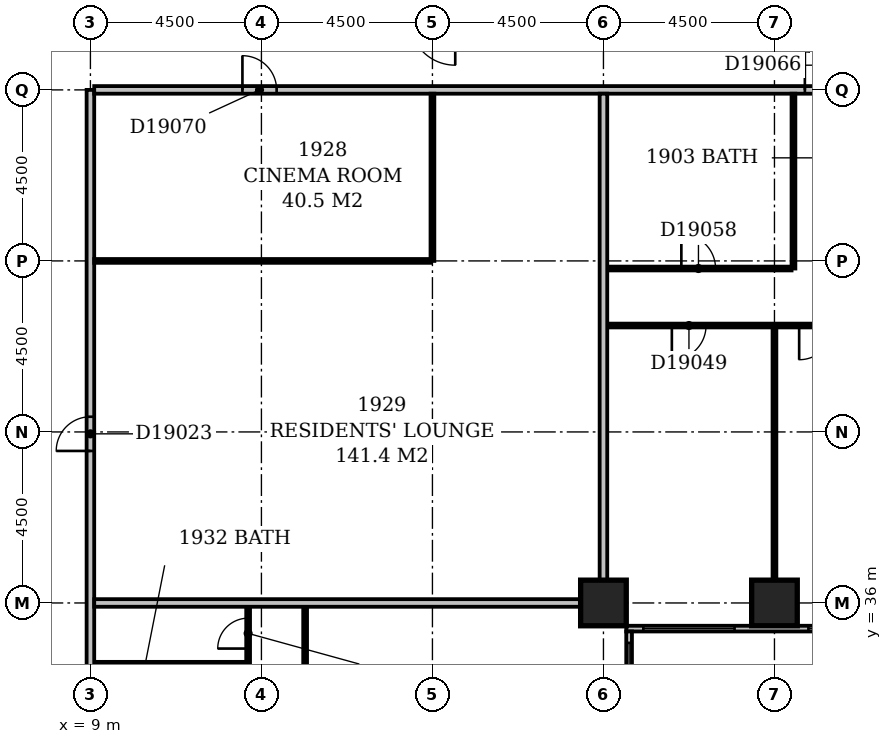
"""IFC4 building model, lengths in metres.
Left out: names, types, materials, properties, quantities, classifications, styles, units other than length and angle.
Written with IfcOpenShell. Run it as: python <this file> out.ifc"""

import sys

from ifc_helpers import new_model, si_unit, direction, frame, frame_2d, origin, origin_2d, place, context, subcontext, project, spatial, rectangle, extrude, element, fill, save


model = new_model("IFC4")
c1 = context("Model", 3, precision=1e-05, world=origin(), true_north=direction((0.0, 1.0)))
c2 = subcontext(c1, "Body", "Model", "MODEL_VIEW")
j1 = project(units=[si_unit("LENGTHUNIT", "METRE"), si_unit("PLANEANGLEUNIT", "RADIAN")], contexts=[c1])
p1 = place(None, origin())
s1 = spatial("IfcSite", under=j1, at=p1, CompositionType="ELEMENT")
p2 = place(p1, origin())
s2 = spatial("IfcBuilding", under=s1, at=p2, CompositionType="ELEMENT")
p3 = place(p2, frame((0.0, 0.0, 79.4)))
s3 = spatial("IfcBuildingStorey", under=s2, at=p3, CompositionType="ELEMENT", Elevation=79.4)
for number, where, z_axis, x_axis in (
    (1, (22.5, 36.0, -0.3), (0.0, 0.0, 1.0), (1.0, 0.0, 0.0)),
    (2, (27.0, 36.0, -0.3), (0.0, 0.0, 1.0), (1.0, 0.0, 0.0)),
):
    element("IfcColumn", number, at=place(p3, frame(where, z_axis=z_axis, x_axis=x_axis)), inside=s3, PredefinedType="COLUMN", context=c2, shape_type="SweptSolid", body=[
        extrude(rectangle(XDim=1.2, YDim=1.2, at=origin_2d()), origin(), (0.0, 0.0, 1.0), 3.6),
    ])
p4 = place(p3, frame((23.175, 17.4, 0.0), z_axis=(0.0, 0.0, 1.0), x_axis=(0.0, 1.0, 0.0)))
e3 = element("IfcWall", 3, at=p4, inside=s3, PredefinedType="STANDARD", context=c2, shape_type="SweptSolid", body=[
    extrude(rectangle(XDim=17.85, YDim=0.15, at=frame_2d((8.925, 0.0))), origin(), (0.0, 0.0, 1.0), 2.7),
])
p5 = place(p4, frame((1.65, 0.0, 0.6)))
e4 = element("IfcOpeningElement", 4, at=p5, cuts=e3, PredefinedType="OPENING", context=c2, shape_type="SweptSolid", body=[
    extrude(rectangle(XDim=2.4, YDim=1.8, at=frame_2d((1.2, 0.9))), frame((0.0, 0.087, 0.0), z_axis=(0.0, -1.0, 0.0), x_axis=(1.0, 0.0, 0.0)), (0.0, 0.0, 1.0), 0.174),
])
p6 = place(p4, frame((6.15, 0.0, 0.6)))
e5 = element("IfcOpeningElement", 5, at=p6, cuts=e3, PredefinedType="OPENING", context=c2, shape_type="SweptSolid", body=[
    extrude(rectangle(XDim=2.4, YDim=1.8, at=frame_2d((1.2, 0.9))), frame((0.0, 0.087, 0.0), z_axis=(0.0, -1.0, 0.0), x_axis=(1.0, 0.0, 0.0)), (0.0, 0.0, 1.0), 0.174),
])
p7 = place(p4, frame((11.448, 0.0, 0.6)))
e6 = element("IfcOpeningElement", 6, at=p7, cuts=e3, PredefinedType="OPENING", context=c2, shape_type="SweptSolid", body=[
    extrude(rectangle(XDim=1.8, YDim=1.8, at=frame_2d((0.9, 0.9))), frame((0.0, 0.087, 0.0), z_axis=(0.0, -1.0, 0.0), x_axis=(1.0, 0.0, 0.0)), (0.0, 0.0, 1.0), 0.174),
])
p8 = place(p4, frame((15.15, 0.0, 0.6)))
e7 = element("IfcOpeningElement", 7, at=p8, cuts=e3, PredefinedType="OPENING", context=c2, shape_type="SweptSolid", body=[
    extrude(rectangle(XDim=2.4, YDim=1.8, at=frame_2d((1.2, 0.9))), frame((0.0, 0.087, 0.0), z_axis=(0.0, -1.0, 0.0), x_axis=(1.0, 0.0, 0.0)), (0.0, 0.0, 1.0), 0.174),
])
p9 = place(p3, frame((23.1, 35.325, 0.0), z_axis=(0.0, 0.0, 1.0), x_axis=(1.0, 0.0, 0.0)))
e8 = element("IfcWall", 8, at=p9, inside=s3, PredefinedType="STANDARD", context=c2, shape_type="SweptSolid", body=[
    extrude(rectangle(XDim=45.15, YDim=0.15, at=frame_2d((22.575, 0.0))), origin(), (0.0, 0.0, 1.0), 2.7),
])
p10 = place(p9, frame((0.45, 0.0, 0.6)))
e9 = element("IfcOpeningElement", 9, at=p10, cuts=e8, PredefinedType="OPENING", context=c2, shape_type="SweptSolid", body=[
    extrude(rectangle(XDim=2.4, YDim=1.8, at=frame_2d((1.2, 0.9))), frame((0.0, 0.087, 0.0), z_axis=(0.0, -1.0, 0.0), x_axis=(1.0, 0.0, 0.0)), (0.0, 0.0, 1.0), 0.174),
])
p11 = place(p9, frame((4.793, 0.0, 0.6)))
e10 = element("IfcOpeningElement", 10, at=p11, cuts=e8, PredefinedType="OPENING", context=c2, shape_type="SweptSolid", body=[
    extrude(rectangle(XDim=1.8, YDim=1.8, at=frame_2d((0.9, 0.9))), frame((0.0, 0.087, 0.0), z_axis=(0.0, -1.0, 0.0), x_axis=(1.0, 0.0, 0.0)), (0.0, 0.0, 1.0), 0.174),
])
p12 = place(p9, frame((9.45, 0.0, 0.6)))
e11 = element("IfcOpeningElement", 11, at=p12, cuts=e8, PredefinedType="OPENING", context=c2, shape_type="SweptSolid", body=[
    extrude(rectangle(XDim=2.4, YDim=1.8, at=frame_2d((1.2, 0.9))), frame((0.0, 0.087, 0.0), z_axis=(0.0, -1.0, 0.0), x_axis=(1.0, 0.0, 0.0)), (0.0, 0.0, 1.0), 0.174),
])
p13 = place(p9, frame((13.95, 0.0, 0.6)))
e12 = element("IfcOpeningElement", 12, at=p13, cuts=e8, PredefinedType="OPENING", context=c2, shape_type="SweptSolid", body=[
    extrude(rectangle(XDim=2.4, YDim=1.8, at=frame_2d((1.2, 0.9))), frame((0.0, 0.087, 0.0), z_axis=(0.0, -1.0, 0.0), x_axis=(1.0, 0.0, 0.0)), (0.0, 0.0, 1.0), 0.174),
])
p14 = place(p9, frame((19.597, 0.0, 0.6)))
e13 = element("IfcOpeningElement", 13, at=p14, cuts=e8, PredefinedType="OPENING", context=c2, shape_type="SweptSolid", body=[
    extrude(rectangle(XDim=1.5, YDim=1.8, at=frame_2d((0.75, 0.9))), frame((0.0, 0.087, 0.0), z_axis=(0.0, -1.0, 0.0), x_axis=(1.0, 0.0, 0.0)), (0.0, 0.0, 1.0), 0.174),
])
p15 = place(p9, frame((22.95, 0.0, 0.6)))
e14 = element("IfcOpeningElement", 14, at=p15, cuts=e8, PredefinedType="OPENING", context=c2, shape_type="SweptSolid", body=[
    extrude(rectangle(XDim=2.4, YDim=1.8, at=frame_2d((1.2, 0.9))), frame((0.0, 0.087, 0.0), z_axis=(0.0, -1.0, 0.0), x_axis=(1.0, 0.0, 0.0)), (0.0, 0.0, 1.0), 0.174),
])
p16 = place(p9, frame((27.45, 0.0, 0.6)))
e15 = element("IfcOpeningElement", 15, at=p16, cuts=e8, PredefinedType="OPENING", context=c2, shape_type="SweptSolid", body=[
    extrude(rectangle(XDim=2.4, YDim=1.8, at=frame_2d((1.2, 0.9))), frame((0.0, 0.087, 0.0), z_axis=(0.0, -1.0, 0.0), x_axis=(1.0, 0.0, 0.0)), (0.0, 0.0, 1.0), 0.174),
])
p17 = place(p9, frame((31.95, 0.0, 0.6)))
e16 = element("IfcOpeningElement", 16, at=p17, cuts=e8, PredefinedType="OPENING", context=c2, shape_type="SweptSolid", body=[
    extrude(rectangle(XDim=2.4, YDim=1.8, at=frame_2d((1.2, 0.9))), frame((0.0, 0.087, 0.0), z_axis=(0.0, -1.0, 0.0), x_axis=(1.0, 0.0, 0.0)), (0.0, 0.0, 1.0), 0.174),
])
p18 = place(p9, frame((37.861, 0.0, 0.6)))
e17 = element("IfcOpeningElement", 17, at=p18, cuts=e8, PredefinedType="OPENING", context=c2, shape_type="SweptSolid", body=[
    extrude(rectangle(XDim=1.2, YDim=1.8, at=frame_2d((0.6, 0.9))), frame((0.0, 0.087, 0.0), z_axis=(0.0, -1.0, 0.0), x_axis=(1.0, 0.0, 0.0)), (0.0, 0.0, 1.0), 0.174),
])
p19 = place(p9, frame((40.95, 0.0, 0.6)))
e18 = element("IfcOpeningElement", 18, at=p19, cuts=e8, PredefinedType="OPENING", context=c2, shape_type="SweptSolid", body=[
    extrude(rectangle(XDim=2.4, YDim=1.8, at=frame_2d((1.2, 0.9))), frame((0.0, 0.087, 0.0), z_axis=(0.0, -1.0, 0.0), x_axis=(1.0, 0.0, 0.0)), (0.0, 0.0, 1.0), 0.174),
])
p20 = place(p3, frame((9.0, 5.0, 0.0), z_axis=(0.0, 0.0, 1.0), x_axis=(0.0, 1.0, 0.0)))
e19 = element("IfcWall", 19, at=p20, inside=s3, PredefinedType="PARTITIONING", context=c2, shape_type="SweptSolid", body=[
    extrude(rectangle(XDim=44.5, YDim=0.2, at=frame_2d((22.25, 0.0))), origin(), (0.0, 0.0, 1.0), 3.3),
])
p21 = place(p20, frame((17.8, 0.0, 0.0)))
e20 = element("IfcOpeningElement", 20, at=p21, cuts=e19, PredefinedType="OPENING", context=c2, shape_type="SweptSolid", body=[
    extrude(rectangle(XDim=1.0, YDim=2.1, at=frame_2d((0.5, 1.05))), frame((0.0, 0.112, 0.0), z_axis=(0.0, -1.0, 0.0), x_axis=(1.0, 0.0, 0.0)), (0.0, 0.0, 1.0), 0.224),
])
p22 = place(p20, frame((14.95, 0.0, 0.0)))
e21 = element("IfcOpeningElement", 21, at=p22, cuts=e19, PredefinedType="OPENING", context=c2, shape_type="SweptSolid", body=[
    extrude(rectangle(XDim=1.0, YDim=2.1, at=frame_2d((0.5, 1.05))), frame((0.0, 0.112, 0.0), z_axis=(0.0, -1.0, 0.0), x_axis=(1.0, 0.0, 0.0)), (0.0, 0.0, 1.0), 0.224),
])
p23 = place(p20, frame((10.45, 0.0, 0.0)))
e22 = element("IfcOpeningElement", 22, at=p23, cuts=e19, PredefinedType="OPENING", context=c2, shape_type="SweptSolid", body=[
    extrude(rectangle(XDim=1.0, YDim=2.1, at=frame_2d((0.5, 1.05))), frame((0.0, 0.112, 0.0), z_axis=(0.0, -1.0, 0.0), x_axis=(1.0, 0.0, 0.0)), (0.0, 0.0, 1.0), 0.224),
])
p24 = place(p20, frame((5.95, 0.0, 0.0)))
e23 = element("IfcOpeningElement", 23, at=p24, cuts=e19, PredefinedType="OPENING", context=c2, shape_type="SweptSolid", body=[
    extrude(rectangle(XDim=1.0, YDim=2.1, at=frame_2d((0.5, 1.05))), frame((0.0, 0.112, 0.0), z_axis=(0.0, -1.0, 0.0), x_axis=(1.0, 0.0, 0.0)), (0.0, 0.0, 1.0), 0.224),
])
p25 = place(p20, frame((35.0, 0.0, 0.0)))
e24 = element("IfcOpeningElement", 24, at=p25, cuts=e19, PredefinedType="OPENING", context=c2, shape_type="SweptSolid", body=[
    extrude(rectangle(XDim=0.9, YDim=2.1, at=frame_2d((0.45, 1.05))), frame((0.0, 0.112, 0.0), z_axis=(0.0, -1.0, 0.0), x_axis=(1.0, 0.0, 0.0)), (0.0, 0.0, 1.0), 0.224),
])
p26 = place(p20, frame((1.5, 0.0, 0.0)))
e25 = element("IfcOpeningElement", 25, at=p26, cuts=e19, PredefinedType="OPENING", context=c2, shape_type="SweptSolid", body=[
    extrude(rectangle(XDim=0.9, YDim=2.1, at=frame_2d((0.45, 1.05))), frame((0.0, 0.112, 0.0), z_axis=(0.0, -1.0, 0.0), x_axis=(1.0, 0.0, 0.0)), (0.0, 0.0, 1.0), 0.224),
])
p27 = place(p3, frame((14.65, 22.6, 0.0), z_axis=(0.0, 0.0, 1.0), x_axis=(0.0, 1.0, 0.0)))
e26 = element("IfcWall", 26, at=p27, inside=s3, PredefinedType="PARTITIONING", context=c2, shape_type="SweptSolid", body=[
    extrude(rectangle(XDim=13.3, YDim=0.1, at=frame_2d((6.65, 0.0))), origin(), (0.0, 0.0, 1.0), 3.3),
])
p28 = place(p27, frame((1.7, 0.0, 0.0)))
e27 = element("IfcOpeningElement", 27, at=p28, cuts=e26, PredefinedType="OPENING", context=c2, shape_type="SweptSolid", body=[
    extrude(rectangle(XDim=0.9, YDim=2.1, at=frame_2d((0.45, 1.05))), frame((0.0, 0.062, 0.0), z_axis=(0.0, -1.0, 0.0), x_axis=(1.0, 0.0, 0.0)), (0.0, 0.0, 1.0), 0.124),
])
p29 = place(p27, frame((6.2, 0.0, 0.0)))
e28 = element("IfcOpeningElement", 28, at=p29, cuts=e26, PredefinedType="OPENING", context=c2, shape_type="SweptSolid", body=[
    extrude(rectangle(XDim=0.9, YDim=2.1, at=frame_2d((0.45, 1.05))), frame((0.0, 0.062, 0.0), z_axis=(0.0, -1.0, 0.0), x_axis=(1.0, 0.0, 0.0)), (0.0, 0.0, 1.0), 0.124),
])
p30 = place(p27, frame((10.7, 0.0, 0.0)))
e29 = element("IfcOpeningElement", 29, at=p30, cuts=e26, PredefinedType="OPENING", context=c2, shape_type="SweptSolid", body=[
    extrude(rectangle(XDim=0.9, YDim=2.1, at=frame_2d((0.45, 1.05))), frame((0.0, 0.062, 0.0), z_axis=(0.0, -1.0, 0.0), x_axis=(1.0, 0.0, 0.0)), (0.0, 0.0, 1.0), 0.124),
])
p31 = place(p3, frame((13.15, 24.1, 0.0), z_axis=(0.0, 0.0, 1.0), x_axis=(0.0, 1.0, 0.0)))
e30 = element("IfcWall", 30, at=p31, inside=s3, PredefinedType="PARTITIONING", context=c2, shape_type="SweptSolid", body=[
    extrude(rectangle(XDim=11.8, YDim=0.1, at=frame_2d((5.9, 0.0))), origin(), (0.0, 0.0, 1.0), 3.3),
])
p32 = place(p31, frame((8.7, 0.0, 0.0)))
e31 = element("IfcOpeningElement", 31, at=p32, cuts=e30, PredefinedType="OPENING", context=c2, shape_type="SweptSolid", body=[
    extrude(rectangle(XDim=0.8, YDim=2.1, at=frame_2d((0.4, 1.05))), frame((0.0, 0.062, 0.0), z_axis=(0.0, -1.0, 0.0), x_axis=(1.0, 0.0, 0.0)), (0.0, 0.0, 1.0), 0.124),
])
p33 = place(p31, frame((3.5, 0.0, 0.0)))
e32 = element("IfcOpeningElement", 32, at=p33, cuts=e30, PredefinedType="OPENING", context=c2, shape_type="SweptSolid", body=[
    extrude(rectangle(XDim=0.9, YDim=2.1, at=frame_2d((0.45, 1.05))), frame((0.0, 0.062, 0.0), z_axis=(0.0, -1.0, 0.0), x_axis=(1.0, 0.0, 0.0)), (0.0, 0.0, 1.0), 0.124),
])
p34 = place(p31, frame((10.7, 0.0, 0.0)))
e33 = element("IfcOpeningElement", 33, at=p34, cuts=e30, PredefinedType="OPENING", context=c2, shape_type="SweptSolid", body=[
    extrude(rectangle(XDim=0.8, YDim=2.1, at=frame_2d((0.4, 1.05))), frame((0.0, 0.062, 0.0), z_axis=(0.0, -1.0, 0.0), x_axis=(1.0, 0.0, 0.0)), (0.0, 0.0, 1.0), 0.124),
])
p35 = place(p3, frame((9.1, 34.4, 0.0), z_axis=(0.0, 0.0, 1.0), x_axis=(1.0, 0.0, 0.0)))
e34 = element("IfcWall", 34, at=p35, inside=s3, PredefinedType="PLUMBINGWALL", context=c2, shape_type="SweptSolid", body=[
    extrude(rectangle(XDim=4.0, YDim=0.1, at=frame_2d((2.0, 0.0))), origin(), (0.0, 0.0, 1.0), 3.3),
])
p36 = place(p3, frame((9.1, 36.0, 0.0), z_axis=(0.0, 0.0, 1.0), x_axis=(1.0, 0.0, 0.0)))
e35 = element("IfcWall", 35, at=p36, inside=s3, PredefinedType="PARTITIONING", context=c2, shape_type="SweptSolid", body=[
    extrude(rectangle(XDim=12.8, YDim=0.2, at=frame_2d((6.4, 0.0))), origin(), (0.0, 0.0, 1.0), 2.4),
])
p37 = place(p3, frame((22.5, 36.6, 0.0), z_axis=(0.0, 0.0, 1.0), x_axis=(0.0, 1.0, 0.0)))
e36 = element("IfcWall", 36, at=p37, inside=s3, PredefinedType="PARTITIONING", context=c2, shape_type="SweptSolid", body=[
    extrude(rectangle(XDim=12.8, YDim=0.2, at=frame_2d((6.4, 0.0))), origin(), (0.0, 0.0, 1.0), 3.3),
])
p38 = place(p3, frame((27.0, 36.6, 0.0), z_axis=(0.0, 0.0, 1.0), x_axis=(0.0, 1.0, 0.0)))
e37 = element("IfcWall", 37, at=p38, inside=s3, PredefinedType="PARTITIONING", context=c2, shape_type="SweptSolid", body=[
    extrude(rectangle(XDim=6.65, YDim=0.1, at=frame_2d((3.325, 0.0))), origin(), (0.0, 0.0, 1.0), 2.6),
])
p39 = place(p3, frame((22.6, 43.3, 0.0), z_axis=(0.0, 0.0, 1.0), x_axis=(1.0, 0.0, 0.0)))
e38 = element("IfcWall", 38, at=p39, inside=s3, PredefinedType="PARTITIONING", context=c2, shape_type="SweptSolid", body=[
    extrude(rectangle(XDim=8.8, YDim=0.1, at=frame_2d((4.4, 0.0))), origin(), (0.0, 0.0, 1.0), 3.3),
])
p40 = place(p39, frame((1.7, 0.0, 0.0)))
e39 = element("IfcOpeningElement", 39, at=p40, cuts=e38, PredefinedType="OPENING", context=c2, shape_type="SweptSolid", body=[
    extrude(rectangle(XDim=0.9, YDim=2.1, at=frame_2d((0.45, 1.05))), frame((0.0, 0.062, 0.0), z_axis=(0.0, -1.0, 0.0), x_axis=(1.0, 0.0, 0.0)), (0.0, 0.0, 1.0), 0.124),
])
p41 = place(p39, frame((5.05, 0.0, 0.0)))
e40 = element("IfcOpeningElement", 40, at=p41, cuts=e38, PredefinedType="OPENING", context=c2, shape_type="SweptSolid", body=[
    extrude(rectangle(XDim=0.9, YDim=2.1, at=frame_2d((0.45, 1.05))), frame((0.0, 0.062, 0.0), z_axis=(0.0, -1.0, 0.0), x_axis=(1.0, 0.0, 0.0)), (0.0, 0.0, 1.0), 0.124),
])
p42 = place(p3, frame((22.6, 44.8, 0.0), z_axis=(0.0, 0.0, 1.0), x_axis=(1.0, 0.0, 0.0)))
e41 = element("IfcWall", 41, at=p42, inside=s3, PredefinedType="PARTITIONING", context=c2, shape_type="SweptSolid", body=[
    extrude(rectangle(XDim=4.85, YDim=0.1, at=frame_2d((2.425, 0.0))), origin(), (0.0, 0.0, 1.0), 3.3),
])
p43 = place(p42, frame((1.95, 0.0, 0.0)))
e42 = element("IfcOpeningElement", 42, at=p43, cuts=e41, PredefinedType="OPENING", context=c2, shape_type="SweptSolid", body=[
    extrude(rectangle(XDim=0.9, YDim=2.1, at=frame_2d((0.45, 1.05))), frame((0.0, 0.062, 0.0), z_axis=(0.0, -1.0, 0.0), x_axis=(1.0, 0.0, 0.0)), (0.0, 0.0, 1.0), 0.124),
])
p44 = place(p3, frame((27.5, 44.8, 0.0), z_axis=(0.0, 0.0, 1.0), x_axis=(0.0, 1.0, 0.0)))
e43 = element("IfcWall", 43, at=p44, inside=s3, PredefinedType="PARTITIONING", context=c2, shape_type="SweptSolid", body=[
    extrude(rectangle(XDim=4.6, YDim=0.1, at=frame_2d((2.3, 0.0))), origin(), (0.0, 0.0, 1.0), 2.6),
])
p45 = place(p3, frame((9.1, 45.0, 0.0), z_axis=(0.0, 0.0, 1.0), x_axis=(1.0, 0.0, 0.0)))
e44 = element("IfcWall", 44, at=p45, inside=s3, PredefinedType="PARTITIONING", context=c2, shape_type="SweptSolid", body=[
    extrude(rectangle(XDim=8.85, YDim=0.1, at=frame_2d((4.425, 0.0))), origin(), (0.0, 0.0, 1.0), 3.3),
])
p46 = place(p3, frame((18.0, 45.0, 0.0), z_axis=(0.0, 0.0, 1.0), x_axis=(0.0, 1.0, 0.0)))
e45 = element("IfcWall", 45, at=p46, inside=s3, PredefinedType="PARTITIONING", context=c2, shape_type="SweptSolid", body=[
    extrude(rectangle(XDim=4.4, YDim=0.1, at=frame_2d((2.2, 0.0))), origin(), (0.0, 0.0, 1.0), 3.3),
])
p47 = place(p3, frame((9.1, 49.5, 0.0), z_axis=(0.0, 0.0, 1.0), x_axis=(1.0, 0.0, 0.0)))
e46 = element("IfcWall", 46, at=p47, inside=s3, PredefinedType="PARTITIONING", context=c2, shape_type="SweptSolid", body=[
    extrude(rectangle(XDim=57.8, YDim=0.2, at=frame_2d((28.9, 0.0))), origin(), (0.0, 0.0, 1.0), 3.3),
])
p48 = place(p47, frame((18.7, 0.0, 0.0)))
e47 = element("IfcOpeningElement", 47, at=p48, cuts=e46, PredefinedType="OPENING", context=c2, shape_type="SweptSolid", body=[
    extrude(rectangle(XDim=1.0, YDim=2.1, at=frame_2d((0.5, 1.05))), frame((0.0, 0.112, 0.0), z_axis=(0.0, -1.0, 0.0), x_axis=(1.0, 0.0, 0.0)), (0.0, 0.0, 1.0), 0.224),
])
p49 = place(p47, frame((24.35, 0.0, 0.0)))
e48 = element("IfcOpeningElement", 48, at=p49, cuts=e46, PredefinedType="OPENING", context=c2, shape_type="SweptSolid", body=[
    extrude(rectangle(XDim=1.0, YDim=2.1, at=frame_2d((0.5, 1.05))), frame((0.0, 0.112, 0.0), z_axis=(0.0, -1.0, 0.0), x_axis=(1.0, 0.0, 0.0)), (0.0, 0.0, 1.0), 0.224),
])
p50 = place(p47, frame((27.2, 0.0, 0.0)))
e49 = element("IfcOpeningElement", 49, at=p50, cuts=e46, PredefinedType="OPENING", context=c2, shape_type="SweptSolid", body=[
    extrude(rectangle(XDim=1.0, YDim=2.1, at=frame_2d((0.5, 1.05))), frame((0.0, 0.112, 0.0), z_axis=(0.0, -1.0, 0.0), x_axis=(1.0, 0.0, 0.0)), (0.0, 0.0, 1.0), 0.224),
])
p51 = place(p47, frame((43.1, 0.0, 0.0)))
e50 = element("IfcOpeningElement", 50, at=p51, cuts=e46, PredefinedType="OPENING", context=c2, shape_type="SweptSolid", body=[
    extrude(rectangle(XDim=1.0, YDim=2.1, at=frame_2d((0.5, 1.05))), frame((0.0, 0.112, 0.0), z_axis=(0.0, -1.0, 0.0), x_axis=(1.0, 0.0, 0.0)), (0.0, 0.0, 1.0), 0.224),
])
p52 = place(p47, frame((3.9, 0.0, 0.0)))
e51 = element("IfcOpeningElement", 51, at=p52, cuts=e46, PredefinedType="OPENING", context=c2, shape_type="SweptSolid", body=[
    extrude(rectangle(XDim=0.9, YDim=2.1, at=frame_2d((0.45, 1.05))), frame((0.0, 0.112, 0.0), z_axis=(0.0, -1.0, 0.0), x_axis=(1.0, 0.0, 0.0)), (0.0, 0.0, 1.0), 0.224),
])
p53 = place(p8, origin())
e52 = element("IfcWindow", 52, at=p53, inside=s3, PartitioningType="SINGLE_PANEL", PredefinedType="WINDOW", context=c2, shape_type="SweptSolid", body=[
    extrude(rectangle(XDim=2.4, YDim=1.8, at=frame_2d((1.2, 0.9))), frame((0.0, 0.03, 0.0), z_axis=(0.0, -1.0, 0.0), x_axis=(1.0, 0.0, 0.0)), (0.0, 0.0, 1.0), 0.06),
])
fill(e7, e52)
p54 = place(p10, origin())
e53 = element("IfcWindow", 53, at=p54, inside=s3, PartitioningType="SINGLE_PANEL", PredefinedType="WINDOW", context=c2, shape_type="SweptSolid", body=[
    extrude(rectangle(XDim=2.4, YDim=1.8, at=frame_2d((1.2, 0.9))), frame((0.0, 0.03, 0.0), z_axis=(0.0, -1.0, 0.0), x_axis=(1.0, 0.0, 0.0)), (0.0, 0.0, 1.0), 0.06),
])
fill(e9, e53)
p55 = place(p11, origin())
e54 = element("IfcWindow", 54, at=p55, inside=s3, PartitioningType="SINGLE_PANEL", PredefinedType="WINDOW", context=c2, shape_type="SweptSolid", body=[
    extrude(rectangle(XDim=1.8, YDim=1.8, at=frame_2d((0.9, 0.9))), frame((0.0, 0.03, 0.0), z_axis=(0.0, -1.0, 0.0), x_axis=(1.0, 0.0, 0.0)), (0.0, 0.0, 1.0), 0.06),
])
fill(e10, e54)
p56 = place(p25, origin())
e55 = element("IfcDoor", 55, at=p56, inside=s3, OperationType="SINGLE_SWING_LEFT", PredefinedType="DOOR", context=c2, shape_type="SweptSolid", body=[
    extrude(rectangle(XDim=0.9, YDim=2.1, at=frame_2d((0.45, 1.05))), frame((0.0, 0.025, 0.0), z_axis=(0.0, -1.0, 0.0), x_axis=(1.0, 0.0, 0.0)), (0.0, 0.0, 1.0), 0.05),
])
fill(e24, e55)
p57 = place(p34, origin())
e56 = element("IfcDoor", 56, at=p57, inside=s3, OperationType="SINGLE_SWING_LEFT", PredefinedType="DOOR", context=c2, shape_type="SweptSolid", body=[
    extrude(rectangle(XDim=0.8, YDim=2.1, at=frame_2d((0.4, 1.05))), frame((0.0, 0.025, 0.0), z_axis=(0.0, -1.0, 0.0), x_axis=(1.0, 0.0, 0.0)), (0.0, 0.0, 1.0), 0.05),
])
fill(e33, e56)
p58 = place(p40, frame((0.9, 0.0, 0.0), z_axis=(0.0, 0.0, 1.0), x_axis=(-1.0, 0.0, 0.0)))
e57 = element("IfcDoor", 57, at=p58, inside=s3, OperationType="SINGLE_SWING_RIGHT", PredefinedType="DOOR", context=c2, shape_type="SweptSolid", body=[
    extrude(rectangle(XDim=0.9, YDim=2.1, at=frame_2d((0.45, 1.05))), frame((0.0, 0.025, 0.0), z_axis=(0.0, -1.0, 0.0), x_axis=(1.0, 0.0, 0.0)), (0.0, 0.0, 1.0), 0.05),
])
fill(e39, e57)
p59 = place(p41, frame((0.9, 0.0, 0.0), z_axis=(0.0, 0.0, 1.0), x_axis=(-1.0, 0.0, 0.0)))
e58 = element("IfcDoor", 58, at=p59, inside=s3, OperationType="SINGLE_SWING_RIGHT", PredefinedType="DOOR", context=c2, shape_type="SweptSolid", body=[
    extrude(rectangle(XDim=0.9, YDim=2.1, at=frame_2d((0.45, 1.05))), frame((0.0, 0.025, 0.0), z_axis=(0.0, -1.0, 0.0), x_axis=(1.0, 0.0, 0.0)), (0.0, 0.0, 1.0), 0.05),
])
fill(e40, e58)
p60 = place(p43, origin())
e59 = element("IfcDoor", 59, at=p60, inside=s3, OperationType="SINGLE_SWING_LEFT", PredefinedType="DOOR", context=c2, shape_type="SweptSolid", body=[
    extrude(rectangle(XDim=0.9, YDim=2.1, at=frame_2d((0.45, 1.05))), frame((0.0, 0.025, 0.0), z_axis=(0.0, -1.0, 0.0), x_axis=(1.0, 0.0, 0.0)), (0.0, 0.0, 1.0), 0.05),
])
fill(e42, e59)
p61 = place(p48, origin())
e60 = element("IfcDoor", 60, at=p61, inside=s3, OperationType="SINGLE_SWING_LEFT", PredefinedType="DOOR", context=c2, shape_type="SweptSolid", body=[
    extrude(rectangle(XDim=1.0, YDim=2.1, at=frame_2d((0.5, 1.05))), frame((0.0, 0.025, 0.0), z_axis=(0.0, -1.0, 0.0), x_axis=(1.0, 0.0, 0.0)), (0.0, 0.0, 1.0), 0.05),
])
fill(e47, e60)
p62 = place(p52, origin())
e61 = element("IfcDoor", 61, at=p62, inside=s3, OperationType="SINGLE_SWING_LEFT", PredefinedType="DOOR", context=c2, shape_type="SweptSolid", body=[
    extrude(rectangle(XDim=0.9, YDim=2.1, at=frame_2d((0.45, 1.05))), frame((0.0, 0.025, 0.0), z_axis=(0.0, -1.0, 0.0), x_axis=(1.0, 0.0, 0.0)), (0.0, 0.0, 1.0), 0.05),
])
fill(e51, e61)
save(model, sys.argv[1])
